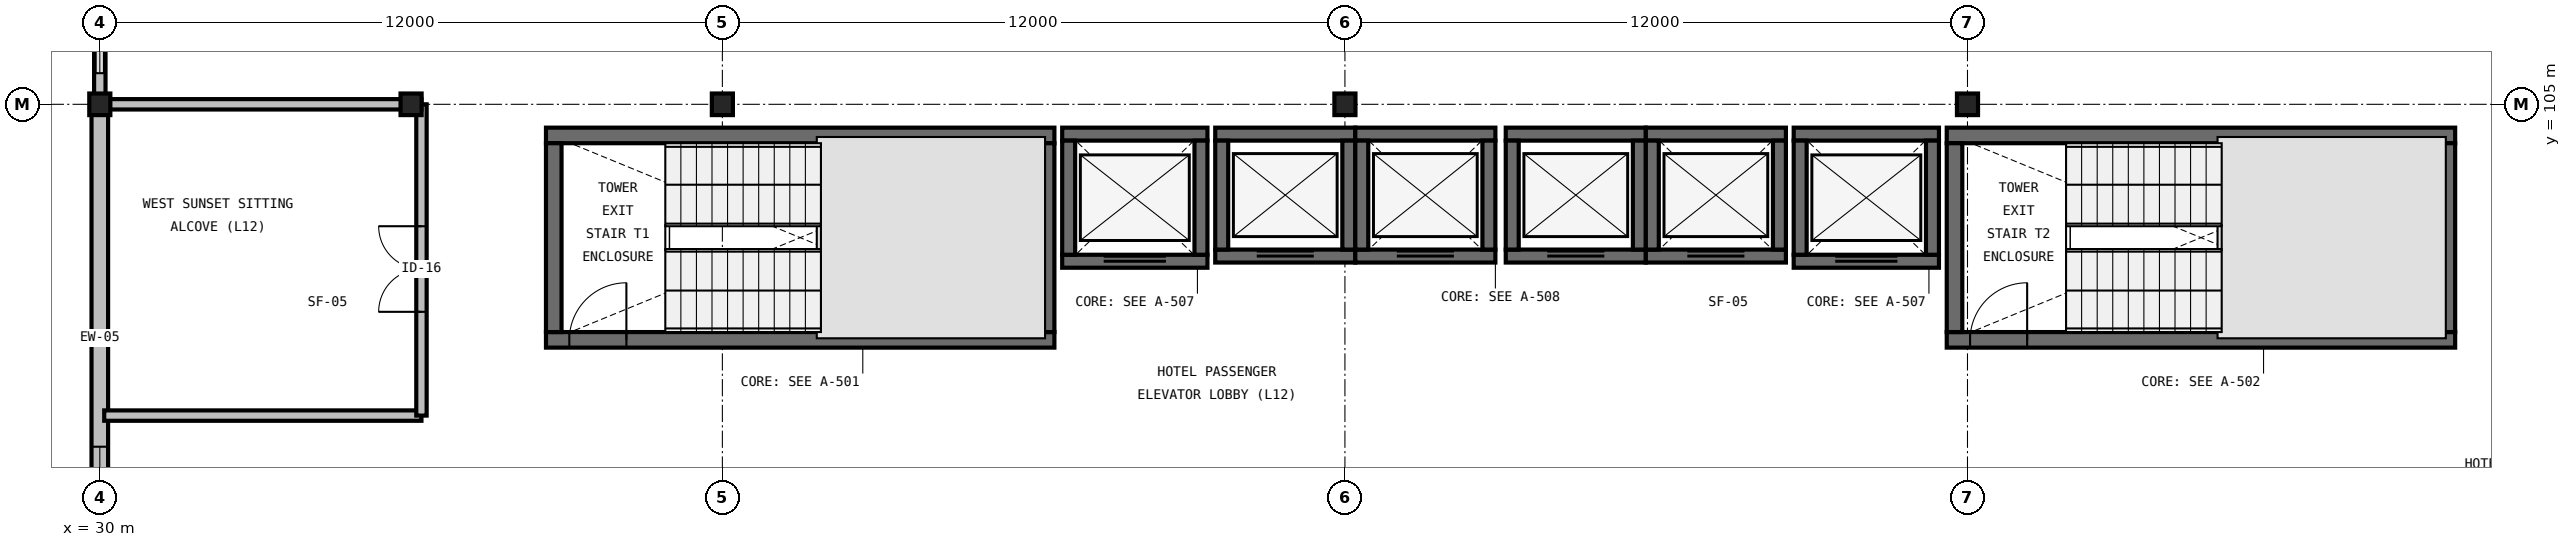
"""IFC4 building model, lengths in metres.
Left out: names, types, materials, properties, quantities, classifications, styles, units other than length and angle.
Written with IfcOpenShell. Run it as: python <this file> out.ifc"""

import sys

from ifc_helpers import new_model, si_unit, direction, frame, frame_2d, origin, origin_2d, place, context, subcontext, project, spatial, rectangle, i_section, extrude, element, fill, save


model = new_model("IFC4")
c1 = context("Model", 3, precision=1e-05, world=origin(), true_north=direction((0.0, 1.0)))
c2 = subcontext(c1, "Body", "Model", "MODEL_VIEW")
j1 = project(units=[si_unit("LENGTHUNIT", "METRE"), si_unit("PLANEANGLEUNIT", "RADIAN")], contexts=[c1])
p1 = place(None, origin())
s1 = spatial("IfcSite", under=j1, at=p1, CompositionType="ELEMENT")
p2 = place(p1, origin())
s2 = spatial("IfcBuilding", under=s1, at=p2, CompositionType="ELEMENT")
p3 = place(p2, frame((0.0, 0.0, 52.8)))
s3 = spatial("IfcBuildingStorey", under=s2, at=p3, CompositionType="ELEMENT", Elevation=52.8)
for number, where, z_axis, x_axis in (
    (1, (30.0, 105.0, 0.0), (0.0, 0.0, 1.0), (1.0, 0.0, 0.0)),
    (2, (36.0, 105.0, 0.0), (0.0, 0.0, 1.0), (1.0, 0.0, 0.0)),
    (3, (42.0, 105.0, 0.0), (0.0, 0.0, 1.0), (1.0, 0.0, 0.0)),
    (4, (54.0, 105.0, 0.0), (0.0, 0.0, 1.0), (1.0, 0.0, 0.0)),
    (5, (66.0, 105.0, 0.0), (0.0, 0.0, 1.0), (1.0, 0.0, 0.0)),
):
    element("IfcColumn", number, at=place(p3, frame(where, z_axis=z_axis, x_axis=x_axis)), inside=s3, PredefinedType="COLUMN", context=c2, shape_type="SweptSolid", body=[
        extrude(i_section(OverallWidth=0.406, OverallDepth=0.416, WebThickness=0.03, FlangeThickness=0.048, FilletRadius=0.031, at=origin_2d()), origin(), (0.0, 0.0, 1.0), 3.6),
    ])
p4 = place(p3, frame((38.6, 100.46, 0.0), z_axis=(0.0, 0.0, 1.0), x_axis=(1.0, 0.0, 0.0)))
e6 = element("IfcWall", 6, at=p4, inside=s3, PredefinedType="SHEAR", context=c2, shape_type="SweptSolid", body=[
    extrude(rectangle(XDim=9.8, YDim=0.3, at=frame_2d((4.9, 0.0))), origin(), (0.0, 0.0, 1.0), 3.6),
])
p5 = place(p4, frame((0.45, 0.0, 0.0)))
e7 = element("IfcOpeningElement", 7, at=p5, cuts=e6, PredefinedType="OPENING", context=c2, shape_type="SweptSolid", body=[
    extrude(rectangle(XDim=1.1, YDim=2.2, at=frame_2d((0.55, 1.1))), frame((0.0, 0.165, 0.0), z_axis=(0.0, -1.0, 0.0), x_axis=(1.0, 0.0, 0.0)), (0.0, 0.0, 1.0), 0.33),
])
p6 = place(p3, frame((48.4, 104.4, 0.0), z_axis=(0.0, 0.0, 1.0), x_axis=(-1.0, 0.0, 0.0)))
e8 = element("IfcWall", 8, at=p6, inside=s3, PredefinedType="SHEAR", context=c2, shape_type="SweptSolid", body=[
    extrude(rectangle(XDim=9.8, YDim=0.3, at=frame_2d((4.9, 0.0))), origin(), (0.0, 0.0, 1.0), 3.6),
])
for number, where, z_axis, x_axis in (
    (9, (38.75, 104.25, 0.0), (0.0, 0.0, 1.0), (0.0, -1.0, 0.0)),
    (10, (48.25, 100.61, 0.0), (0.0, 0.0, 1.0), (0.0, 1.0, 0.0)),
):
    element("IfcWall", number, at=place(p3, frame(where, z_axis=z_axis, x_axis=x_axis)), inside=s3, PredefinedType="SHEAR", context=c2, shape_type="SweptSolid", body=[
        extrude(rectangle(XDim=3.64, YDim=0.3, at=frame_2d((1.82, 0.0))), origin(), (0.0, 0.0, 1.0), 3.6),
    ])
p7 = place(p3, frame((65.6, 100.46, 0.0), z_axis=(0.0, 0.0, 1.0), x_axis=(1.0, 0.0, 0.0)))
e11 = element("IfcWall", 11, at=p7, inside=s3, PredefinedType="SHEAR", context=c2, shape_type="SweptSolid", body=[
    extrude(rectangle(XDim=9.8, YDim=0.3, at=frame_2d((4.9, 0.0))), origin(), (0.0, 0.0, 1.0), 3.6),
])
p8 = place(p7, frame((0.45, 0.0, 0.0)))
e12 = element("IfcOpeningElement", 12, at=p8, cuts=e11, PredefinedType="OPENING", context=c2, shape_type="SweptSolid", body=[
    extrude(rectangle(XDim=1.1, YDim=2.2, at=frame_2d((0.55, 1.1))), frame((0.0, 0.165, 0.0), z_axis=(0.0, -1.0, 0.0), x_axis=(1.0, 0.0, 0.0)), (0.0, 0.0, 1.0), 0.33),
])
p9 = place(p3, frame((75.4, 104.4, 0.0), z_axis=(0.0, 0.0, 1.0), x_axis=(-1.0, 0.0, 0.0)))
e13 = element("IfcWall", 13, at=p9, inside=s3, PredefinedType="SHEAR", context=c2, shape_type="SweptSolid", body=[
    extrude(rectangle(XDim=9.8, YDim=0.3, at=frame_2d((4.9, 0.0))), origin(), (0.0, 0.0, 1.0), 3.6),
])
for number, where, z_axis, x_axis in (
    (14, (65.75, 104.25, 0.0), (0.0, 0.0, 1.0), (0.0, -1.0, 0.0)),
    (15, (75.25, 100.61, 0.0), (0.0, 0.0, 1.0), (0.0, 1.0, 0.0)),
):
    element("IfcWall", number, at=place(p3, frame(where, z_axis=z_axis, x_axis=x_axis)), inside=s3, PredefinedType="SHEAR", context=c2, shape_type="SweptSolid", body=[
        extrude(rectangle(XDim=3.64, YDim=0.3, at=frame_2d((1.82, 0.0))), origin(), (0.0, 0.0, 1.0), 3.6),
    ])
p10 = place(p3, frame((48.55, 101.975, 0.0), z_axis=(0.0, 0.0, 1.0), x_axis=(1.0, 0.0, 0.0)))
e16 = element("IfcWall", 16, at=p10, inside=s3, PredefinedType="SHEAR", context=c2, shape_type="SweptSolid", body=[
    extrude(rectangle(XDim=2.8, YDim=0.25, at=frame_2d((1.4, 0.0))), origin(), (0.0, 0.0, 1.0), 3.6),
])
p11 = place(p10, frame((0.8, 0.0, 0.0)))
e17 = element("IfcOpeningElement", 17, at=p11, cuts=e16, PredefinedType="OPENING", context=c2, shape_type="SweptSolid", body=[
    extrude(rectangle(XDim=1.2, YDim=2.2, at=frame_2d((0.6, 1.1))), frame((0.0, 0.14, 0.0), z_axis=(0.0, -1.0, 0.0), x_axis=(1.0, 0.0, 0.0)), (0.0, 0.0, 1.0), 0.28),
])
p12 = place(p3, frame((51.35, 104.425, 0.0), z_axis=(0.0, 0.0, 1.0), x_axis=(-1.0, 0.0, 0.0)))
e18 = element("IfcWall", 18, at=p12, inside=s3, PredefinedType="SHEAR", context=c2, shape_type="SweptSolid", body=[
    extrude(rectangle(XDim=2.8, YDim=0.25, at=frame_2d((1.4, 0.0))), origin(), (0.0, 0.0, 1.0), 3.6),
])
for number, where, z_axis, x_axis in (
    (19, (48.675, 104.3, 0.0), (0.0, 0.0, 1.0), (0.0, -1.0, 0.0)),
    (20, (51.225, 102.1, 0.0), (0.0, 0.0, 1.0), (0.0, 1.0, 0.0)),
):
    element("IfcWall", number, at=place(p3, frame(where, z_axis=z_axis, x_axis=x_axis)), inside=s3, PredefinedType="SHEAR", context=c2, shape_type="SweptSolid", body=[
        extrude(rectangle(XDim=2.2, YDim=0.25, at=frame_2d((1.1, 0.0))), origin(), (0.0, 0.0, 1.0), 3.6),
    ])
p13 = place(p3, frame((62.65, 101.975, 0.0), z_axis=(0.0, 0.0, 1.0), x_axis=(1.0, 0.0, 0.0)))
e21 = element("IfcWall", 21, at=p13, inside=s3, PredefinedType="SHEAR", context=c2, shape_type="SweptSolid", body=[
    extrude(rectangle(XDim=2.8, YDim=0.25, at=frame_2d((1.4, 0.0))), origin(), (0.0, 0.0, 1.0), 3.6),
])
p14 = place(p13, frame((0.8, 0.0, 0.0)))
e22 = element("IfcOpeningElement", 22, at=p14, cuts=e21, PredefinedType="OPENING", context=c2, shape_type="SweptSolid", body=[
    extrude(rectangle(XDim=1.2, YDim=2.2, at=frame_2d((0.6, 1.1))), frame((0.0, 0.14, 0.0), z_axis=(0.0, -1.0, 0.0), x_axis=(1.0, 0.0, 0.0)), (0.0, 0.0, 1.0), 0.28),
])
p15 = place(p3, frame((65.45, 104.425, 0.0), z_axis=(0.0, 0.0, 1.0), x_axis=(-1.0, 0.0, 0.0)))
e23 = element("IfcWall", 23, at=p15, inside=s3, PredefinedType="SHEAR", context=c2, shape_type="SweptSolid", body=[
    extrude(rectangle(XDim=2.8, YDim=0.25, at=frame_2d((1.4, 0.0))), origin(), (0.0, 0.0, 1.0), 3.6),
])
for number, where, z_axis, x_axis in (
    (24, (62.775, 104.3, 0.0), (0.0, 0.0, 1.0), (0.0, -1.0, 0.0)),
    (25, (65.325, 102.1, 0.0), (0.0, 0.0, 1.0), (0.0, 1.0, 0.0)),
):
    element("IfcWall", number, at=place(p3, frame(where, z_axis=z_axis, x_axis=x_axis)), inside=s3, PredefinedType="SHEAR", context=c2, shape_type="SweptSolid", body=[
        extrude(rectangle(XDim=2.2, YDim=0.25, at=frame_2d((1.1, 0.0))), origin(), (0.0, 0.0, 1.0), 3.6),
    ])
p16 = place(p3, frame((51.5, 102.075, 0.0), z_axis=(0.0, 0.0, 1.0), x_axis=(1.0, 0.0, 0.0)))
e26 = element("IfcWall", 26, at=p16, inside=s3, PredefinedType="SHEAR", context=c2, shape_type="SweptSolid", body=[
    extrude(rectangle(XDim=2.7, YDim=0.25, at=frame_2d((1.35, 0.0))), origin(), (0.0, 0.0, 1.0), 3.6),
])
p17 = place(p16, frame((0.8, 0.0, 0.0)))
e27 = element("IfcOpeningElement", 27, at=p17, cuts=e26, PredefinedType="OPENING", context=c2, shape_type="SweptSolid", body=[
    extrude(rectangle(XDim=1.1, YDim=2.2, at=frame_2d((0.55, 1.1))), frame((0.0, 0.14, 0.0), z_axis=(0.0, -1.0, 0.0), x_axis=(1.0, 0.0, 0.0)), (0.0, 0.0, 1.0), 0.28),
])
p18 = place(p3, frame((54.2, 104.425, 0.0), z_axis=(0.0, 0.0, 1.0), x_axis=(-1.0, 0.0, 0.0)))
e28 = element("IfcWall", 28, at=p18, inside=s3, PredefinedType="SHEAR", context=c2, shape_type="SweptSolid", body=[
    extrude(rectangle(XDim=2.7, YDim=0.25, at=frame_2d((1.35, 0.0))), origin(), (0.0, 0.0, 1.0), 3.6),
])
for number, where, z_axis, x_axis in (
    (29, (51.625, 104.3, 0.0), (0.0, 0.0, 1.0), (0.0, -1.0, 0.0)),
    (30, (54.075, 102.2, 0.0), (0.0, 0.0, 1.0), (0.0, 1.0, 0.0)),
):
    element("IfcWall", number, at=place(p3, frame(where, z_axis=z_axis, x_axis=x_axis)), inside=s3, PredefinedType="SHEAR", context=c2, shape_type="SweptSolid", body=[
        extrude(rectangle(XDim=2.1, YDim=0.25, at=frame_2d((1.05, 0.0))), origin(), (0.0, 0.0, 1.0), 3.6),
    ])
p19 = place(p3, frame((54.2, 102.075, 0.0), z_axis=(0.0, 0.0, 1.0), x_axis=(1.0, 0.0, 0.0)))
e31 = element("IfcWall", 31, at=p19, inside=s3, PredefinedType="SHEAR", context=c2, shape_type="SweptSolid", body=[
    extrude(rectangle(XDim=2.7, YDim=0.25, at=frame_2d((1.35, 0.0))), origin(), (0.0, 0.0, 1.0), 3.6),
])
p20 = place(p19, frame((0.8, 0.0, 0.0)))
e32 = element("IfcOpeningElement", 32, at=p20, cuts=e31, PredefinedType="OPENING", context=c2, shape_type="SweptSolid", body=[
    extrude(rectangle(XDim=1.1, YDim=2.2, at=frame_2d((0.55, 1.1))), frame((0.0, 0.14, 0.0), z_axis=(0.0, -1.0, 0.0), x_axis=(1.0, 0.0, 0.0)), (0.0, 0.0, 1.0), 0.28),
])
p21 = place(p3, frame((56.9, 104.425, 0.0), z_axis=(0.0, 0.0, 1.0), x_axis=(-1.0, 0.0, 0.0)))
e33 = element("IfcWall", 33, at=p21, inside=s3, PredefinedType="SHEAR", context=c2, shape_type="SweptSolid", body=[
    extrude(rectangle(XDim=2.7, YDim=0.25, at=frame_2d((1.35, 0.0))), origin(), (0.0, 0.0, 1.0), 3.6),
])
for number, where, z_axis, x_axis in (
    (34, (54.325, 104.3, 0.0), (0.0, 0.0, 1.0), (0.0, -1.0, 0.0)),
    (35, (56.775, 102.2, 0.0), (0.0, 0.0, 1.0), (0.0, 1.0, 0.0)),
):
    element("IfcWall", number, at=place(p3, frame(where, z_axis=z_axis, x_axis=x_axis)), inside=s3, PredefinedType="SHEAR", context=c2, shape_type="SweptSolid", body=[
        extrude(rectangle(XDim=2.1, YDim=0.25, at=frame_2d((1.05, 0.0))), origin(), (0.0, 0.0, 1.0), 3.6),
    ])
p22 = place(p3, frame((57.1, 102.075, 0.0), z_axis=(0.0, 0.0, 1.0), x_axis=(1.0, 0.0, 0.0)))
e36 = element("IfcWall", 36, at=p22, inside=s3, PredefinedType="SHEAR", context=c2, shape_type="SweptSolid", body=[
    extrude(rectangle(XDim=2.7, YDim=0.25, at=frame_2d((1.35, 0.0))), origin(), (0.0, 0.0, 1.0), 3.6),
])
p23 = place(p22, frame((0.8, 0.0, 0.0)))
e37 = element("IfcOpeningElement", 37, at=p23, cuts=e36, PredefinedType="OPENING", context=c2, shape_type="SweptSolid", body=[
    extrude(rectangle(XDim=1.1, YDim=2.2, at=frame_2d((0.55, 1.1))), frame((0.0, 0.14, 0.0), z_axis=(0.0, -1.0, 0.0), x_axis=(1.0, 0.0, 0.0)), (0.0, 0.0, 1.0), 0.28),
])
p24 = place(p3, frame((59.8, 104.425, 0.0), z_axis=(0.0, 0.0, 1.0), x_axis=(-1.0, 0.0, 0.0)))
e38 = element("IfcWall", 38, at=p24, inside=s3, PredefinedType="SHEAR", context=c2, shape_type="SweptSolid", body=[
    extrude(rectangle(XDim=2.7, YDim=0.25, at=frame_2d((1.35, 0.0))), origin(), (0.0, 0.0, 1.0), 3.6),
])
for number, where, z_axis, x_axis in (
    (39, (57.225, 104.3, 0.0), (0.0, 0.0, 1.0), (0.0, -1.0, 0.0)),
    (40, (59.675, 102.2, 0.0), (0.0, 0.0, 1.0), (0.0, 1.0, 0.0)),
):
    element("IfcWall", number, at=place(p3, frame(where, z_axis=z_axis, x_axis=x_axis)), inside=s3, PredefinedType="SHEAR", context=c2, shape_type="SweptSolid", body=[
        extrude(rectangle(XDim=2.1, YDim=0.25, at=frame_2d((1.05, 0.0))), origin(), (0.0, 0.0, 1.0), 3.6),
    ])
p25 = place(p3, frame((59.8, 102.075, 0.0), z_axis=(0.0, 0.0, 1.0), x_axis=(1.0, 0.0, 0.0)))
e41 = element("IfcWall", 41, at=p25, inside=s3, PredefinedType="SHEAR", context=c2, shape_type="SweptSolid", body=[
    extrude(rectangle(XDim=2.7, YDim=0.25, at=frame_2d((1.35, 0.0))), origin(), (0.0, 0.0, 1.0), 3.6),
])
p26 = place(p25, frame((0.8, 0.0, 0.0)))
e42 = element("IfcOpeningElement", 42, at=p26, cuts=e41, PredefinedType="OPENING", context=c2, shape_type="SweptSolid", body=[
    extrude(rectangle(XDim=1.1, YDim=2.2, at=frame_2d((0.55, 1.1))), frame((0.0, 0.14, 0.0), z_axis=(0.0, -1.0, 0.0), x_axis=(1.0, 0.0, 0.0)), (0.0, 0.0, 1.0), 0.28),
])
p27 = place(p3, frame((62.5, 104.425, 0.0), z_axis=(0.0, 0.0, 1.0), x_axis=(-1.0, 0.0, 0.0)))
e43 = element("IfcWall", 43, at=p27, inside=s3, PredefinedType="SHEAR", context=c2, shape_type="SweptSolid", body=[
    extrude(rectangle(XDim=2.7, YDim=0.25, at=frame_2d((1.35, 0.0))), origin(), (0.0, 0.0, 1.0), 3.6),
])
for number, where, z_axis, x_axis in (
    (44, (59.925, 104.3, 0.0), (0.0, 0.0, 1.0), (0.0, -1.0, 0.0)),
    (45, (62.375, 102.2, 0.0), (0.0, 0.0, 1.0), (0.0, 1.0, 0.0)),
):
    element("IfcWall", number, at=place(p3, frame(where, z_axis=z_axis, x_axis=x_axis)), inside=s3, PredefinedType="SHEAR", context=c2, shape_type="SweptSolid", body=[
        extrude(rectangle(XDim=2.1, YDim=0.25, at=frame_2d((1.05, 0.0))), origin(), (0.0, 0.0, 1.0), 3.6),
    ])
p28 = place(p3, frame((30.0, 105.0, 0.0), z_axis=(0.0, 0.0, 1.0), x_axis=(0.0, -1.0, 0.0)))
e46 = element("IfcWall", 46, at=p28, inside=s3, PredefinedType="STANDARD", context=c2, shape_type="SweptSolid", body=[
    extrude(rectangle(XDim=9.0, YDim=0.32, at=frame_2d((4.5, 0.0))), origin(), (0.0, 0.0, 1.0), 2.981),
])
p29 = place(p28, frame((6.6, 0.0, 0.85)))
e47 = element("IfcOpeningElement", 47, at=p29, cuts=e46, PredefinedType="OPENING", context=c2, shape_type="SweptSolid", body=[
    extrude(rectangle(XDim=1.8, YDim=1.5, at=frame_2d((0.9, 0.75))), frame((0.0, 0.175, 0.0), z_axis=(0.0, -1.0, 0.0), x_axis=(1.0, 0.0, 0.0)), (0.0, 0.0, 1.0), 0.35),
])
p30 = place(p3, frame((30.0, 117.0, 0.0), z_axis=(0.0, 0.0, 1.0), x_axis=(0.0, -1.0, 0.0)))
e48 = element("IfcWall", 48, at=p30, inside=s3, PredefinedType="PARAPET", context=c2, shape_type="SweptSolid", body=[
    extrude(rectangle(XDim=12.0, YDim=0.22, at=frame_2d((6.0, 0.0))), origin(), (0.0, 0.0, 1.0), 0.2),
])
p31 = place(p3, frame((30.085, 99.0, 0.0), z_axis=(0.0, 0.0, 1.0), x_axis=(1.0, 0.0, 0.0)))
e49 = element("IfcWall", 49, at=p31, inside=s3, PredefinedType="PARTITIONING", context=c2, shape_type="SweptSolid", body=[
    extrude(rectangle(XDim=6.115, YDim=0.2, at=frame_2d((3.057, 0.0))), origin(), (0.0, 0.0, 1.0), 3.29),
])
p32 = place(p3, frame((36.2, 99.0, 0.0), z_axis=(0.0, 0.0, 1.0), x_axis=(0.0, 1.0, 0.0)))
e50 = element("IfcWall", 50, at=p32, inside=s3, PredefinedType="PARTITIONING", context=c2, shape_type="SweptSolid", body=[
    extrude(rectangle(XDim=6.0, YDim=0.2, at=frame_2d((3.0, 0.0))), origin(), (0.0, 0.0, 1.0), 3.29),
])
p33 = place(p32, frame((2.0, 0.0, 0.0)))
e51 = element("IfcOpeningElement", 51, at=p33, cuts=e50, PredefinedType="OPENING", context=c2, shape_type="SweptSolid", body=[
    extrude(rectangle(XDim=1.65, YDim=2.25, at=frame_2d((0.825, 1.125))), frame((0.0, 0.115, 0.0), z_axis=(0.0, -1.0, 0.0), x_axis=(1.0, 0.0, 0.0)), (0.0, 0.0, 1.0), 0.23),
])
p34 = place(p3, frame((36.2, 105.0, 0.0), z_axis=(0.0, 0.0, 1.0), x_axis=(-1.0, 0.0, 0.0)))
e52 = element("IfcWall", 52, at=p34, inside=s3, PredefinedType="PARTITIONING", context=c2, shape_type="SweptSolid", body=[
    extrude(rectangle(XDim=6.115, YDim=0.2, at=frame_2d((3.057, 0.0))), origin(), (0.0, 0.0, 1.0), 2.736),
])
p35 = place(p5, origin())
e53 = element("IfcDoor", 53, at=p35, inside=s3, OperationType="SINGLE_SWING_RIGHT", PredefinedType="DOOR", context=c2, shape_type="SweptSolid", body=[
    extrude(rectangle(XDim=1.1, YDim=2.2, at=frame_2d((0.55, 1.1))), frame((0.0, 0.025, 0.0), z_axis=(0.0, -1.0, 0.0), x_axis=(1.0, 0.0, 0.0)), (0.0, 0.0, 1.0), 0.05),
])
fill(e7, e53)
p36 = place(p8, origin())
e54 = element("IfcDoor", 54, at=p36, inside=s3, OperationType="SINGLE_SWING_RIGHT", PredefinedType="DOOR", context=c2, shape_type="SweptSolid", body=[
    extrude(rectangle(XDim=1.1, YDim=2.2, at=frame_2d((0.55, 1.1))), frame((0.0, 0.025, 0.0), z_axis=(0.0, -1.0, 0.0), x_axis=(1.0, 0.0, 0.0)), (0.0, 0.0, 1.0), 0.05),
])
fill(e12, e54)
p37 = place(p11, origin())
e55 = element("IfcDoor", 55, at=p37, inside=s3, OperationType="DOUBLE_DOOR_SLIDING", PredefinedType="DOOR", context=c2, shape_type="SweptSolid", body=[
    extrude(rectangle(XDim=1.2, YDim=2.2, at=frame_2d((0.6, 1.1))), frame((0.0, 0.025, 0.0), z_axis=(0.0, -1.0, 0.0), x_axis=(1.0, 0.0, 0.0)), (0.0, 0.0, 1.0), 0.05),
])
fill(e17, e55)
p38 = place(p14, origin())
e56 = element("IfcDoor", 56, at=p38, inside=s3, OperationType="DOUBLE_DOOR_SLIDING", PredefinedType="DOOR", context=c2, shape_type="SweptSolid", body=[
    extrude(rectangle(XDim=1.2, YDim=2.2, at=frame_2d((0.6, 1.1))), frame((0.0, 0.025, 0.0), z_axis=(0.0, -1.0, 0.0), x_axis=(1.0, 0.0, 0.0)), (0.0, 0.0, 1.0), 0.05),
])
fill(e22, e56)
p39 = place(p17, origin())
e57 = element("IfcDoor", 57, at=p39, inside=s3, OperationType="DOUBLE_DOOR_SLIDING", PredefinedType="DOOR", context=c2, shape_type="SweptSolid", body=[
    extrude(rectangle(XDim=1.1, YDim=2.2, at=frame_2d((0.55, 1.1))), frame((0.0, 0.025, 0.0), z_axis=(0.0, -1.0, 0.0), x_axis=(1.0, 0.0, 0.0)), (0.0, 0.0, 1.0), 0.05),
])
fill(e27, e57)
p40 = place(p20, origin())
e58 = element("IfcDoor", 58, at=p40, inside=s3, OperationType="DOUBLE_DOOR_SLIDING", PredefinedType="DOOR", context=c2, shape_type="SweptSolid", body=[
    extrude(rectangle(XDim=1.1, YDim=2.2, at=frame_2d((0.55, 1.1))), frame((0.0, 0.025, 0.0), z_axis=(0.0, -1.0, 0.0), x_axis=(1.0, 0.0, 0.0)), (0.0, 0.0, 1.0), 0.05),
])
fill(e32, e58)
p41 = place(p23, origin())
e59 = element("IfcDoor", 59, at=p41, inside=s3, OperationType="DOUBLE_DOOR_SLIDING", PredefinedType="DOOR", context=c2, shape_type="SweptSolid", body=[
    extrude(rectangle(XDim=1.1, YDim=2.2, at=frame_2d((0.55, 1.1))), frame((0.0, 0.025, 0.0), z_axis=(0.0, -1.0, 0.0), x_axis=(1.0, 0.0, 0.0)), (0.0, 0.0, 1.0), 0.05),
])
fill(e37, e59)
p42 = place(p26, origin())
e60 = element("IfcDoor", 60, at=p42, inside=s3, OperationType="DOUBLE_DOOR_SLIDING", PredefinedType="DOOR", context=c2, shape_type="SweptSolid", body=[
    extrude(rectangle(XDim=1.1, YDim=2.2, at=frame_2d((0.55, 1.1))), frame((0.0, 0.025, 0.0), z_axis=(0.0, -1.0, 0.0), x_axis=(1.0, 0.0, 0.0)), (0.0, 0.0, 1.0), 0.05),
])
fill(e42, e60)
p43 = place(p29, origin())
e61 = element("IfcWindow", 61, at=p43, inside=s3, PartitioningType="SINGLE_PANEL", PredefinedType="WINDOW", context=c2, shape_type="SweptSolid", body=[
    extrude(rectangle(XDim=1.8, YDim=1.5, at=frame_2d((0.9, 0.75))), frame((0.0, 0.03, 0.0), z_axis=(0.0, -1.0, 0.0), x_axis=(1.0, 0.0, 0.0)), (0.0, 0.0, 1.0), 0.06),
])
fill(e47, e61)
p44 = place(p33, origin())
e62 = element("IfcDoor", 62, at=p44, inside=s3, OperationType="DOUBLE_DOOR_SINGLE_SWING", PredefinedType="DOOR", context=c2, shape_type="SweptSolid", body=[
    extrude(rectangle(XDim=1.65, YDim=2.25, at=frame_2d((0.825, 1.125))), frame((0.0, 0.025, 0.0), z_axis=(0.0, -1.0, 0.0), x_axis=(1.0, 0.0, 0.0)), (0.0, 0.0, 1.0), 0.05),
])
fill(e51, e62)
save(model, sys.argv[1])
